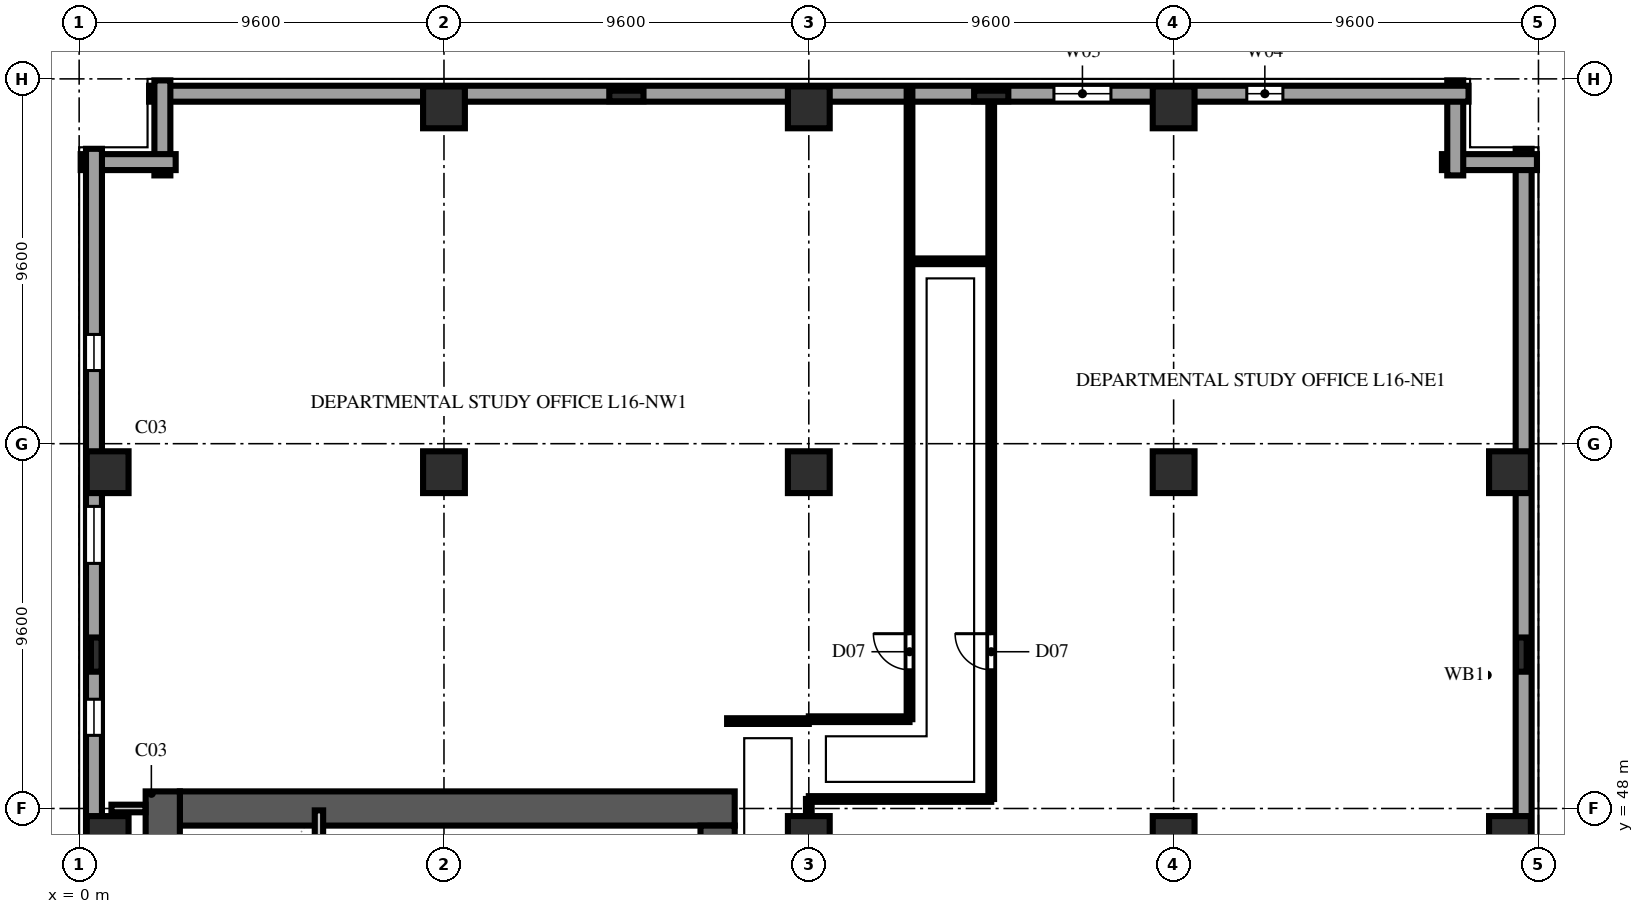
"""IFC4 building model, lengths in metres.
Left out: names, types, materials, properties, quantities, classifications, styles, units other than length and angle.
Written with IfcOpenShell. Run it as: python <this file> out.ifc"""

import sys

from ifc_helpers import new_model, si_unit, direction, frame, frame_2d, origin, origin_2d, place, context, subcontext, project, spatial, rectangle, extrude, element, fill, save


model = new_model("IFC4")
c1 = context("Model", 3, precision=1e-05, world=origin(), true_north=direction((0.0, 1.0)))
c2 = subcontext(c1, "Body", "Model", "MODEL_VIEW")
j1 = project(units=[si_unit("LENGTHUNIT", "METRE"), si_unit("PLANEANGLEUNIT", "RADIAN")], contexts=[c1])
p1 = place(None, origin())
s1 = spatial("IfcSite", under=j1, at=p1, CompositionType="ELEMENT")
p2 = place(p1, origin())
s2 = spatial("IfcBuilding", under=s1, at=p2, CompositionType="ELEMENT")
p3 = place(p2, frame((0.0, 0.0, 66.0)))
s3 = spatial("IfcBuildingStorey", under=s2, at=p3, CompositionType="ELEMENT", Elevation=66.0)
p4 = place(p3, frame((2.65, 48.0, 0.0), z_axis=(0.0, 0.0, 1.0), x_axis=(1.0, 0.0, 0.0)))
e1 = element("IfcWall", 1, at=p4, inside=s3, PredefinedType="SHEAR", context=c2, shape_type="SweptSolid", body=[
    extrude(rectangle(XDim=14.6, YDim=0.9, at=frame_2d((7.3, 0.0))), origin(), (0.0, 0.0, 1.0), 3.54),
])
p5 = place(p3, frame((2.2, 9.15, 0.0), z_axis=(0.0, 0.0, 1.0), x_axis=(0.0, 1.0, 0.0)))
e2 = element("IfcWall", 2, at=p5, inside=s3, PredefinedType="SHEAR", context=c2, shape_type="SweptSolid", body=[
    extrude(rectangle(XDim=39.3, YDim=0.9, at=frame_2d((19.65, 0.0))), origin(), (0.0, 0.0, 1.0), 3.54),
])
p6 = place(p3, frame((16.8, 36.4, 0.0), z_axis=(0.0, 0.0, 1.0), x_axis=(0.0, 1.0, 0.0)))
e3 = element("IfcWall", 3, at=p6, inside=s3, PredefinedType="SHEAR", context=c2, shape_type="SweptSolid", body=[
    extrude(rectangle(XDim=11.15, YDim=0.9, at=frame_2d((5.575, 0.0))), origin(), (0.0, 0.0, 1.0), 3.54),
])
p7 = place(p6, frame((9.2, 0.0, 0.0)))
e4 = element("IfcOpeningElement", 4, at=p7, cuts=e3, PredefinedType="OPENING", context=c2, shape_type="SweptSolid", body=[
    extrude(rectangle(XDim=0.95, YDim=2.15, at=frame_2d((0.475, 1.075))), frame((0.0, 0.462, 0.0), z_axis=(0.0, -1.0, 0.0), x_axis=(1.0, 0.0, 0.0)), (0.0, 0.0, 1.0), 0.924),
])
for number, where, z_axis, x_axis in (
    (5, (0.75, 47.25, 0.0), (0.0, 0.0, 1.0), (1.0, 0.0, 0.0)),
    (6, (0.75, 56.85, 0.0), (0.0, 0.0, 1.0), (1.0, 0.0, 0.0)),
    (7, (9.6, 56.85, 0.0), (0.0, 0.0, 1.0), (1.0, 0.0, 0.0)),
    (8, (9.6, 66.45, 0.0), (0.0, 0.0, 1.0), (1.0, 0.0, 0.0)),
    (9, (19.2, 47.25, 0.0), (0.0, 0.0, 1.0), (1.0, 0.0, 0.0)),
    (10, (19.2, 56.85, 0.0), (0.0, 0.0, 1.0), (1.0, 0.0, 0.0)),
    (11, (19.2, 66.45, 0.0), (0.0, 0.0, 1.0), (1.0, 0.0, 0.0)),
    (12, (28.8, 47.25, 0.0), (0.0, 0.0, 1.0), (1.0, 0.0, 0.0)),
    (13, (28.8, 56.85, 0.0), (0.0, 0.0, 1.0), (1.0, 0.0, 0.0)),
    (14, (28.8, 66.45, 0.0), (0.0, 0.0, 1.0), (1.0, 0.0, 0.0)),
    (15, (37.65, 47.25, 0.0), (0.0, 0.0, 1.0), (1.0, 0.0, 0.0)),
    (16, (37.65, 56.85, 0.0), (0.0, 0.0, 1.0), (1.0, 0.0, 0.0)),
):
    element("IfcColumn", number, at=place(p3, frame(where, z_axis=z_axis, x_axis=x_axis)), inside=s3, PredefinedType="COLUMN", context=c2, shape_type="SweptSolid", body=[
        extrude(rectangle(XDim=1.1, YDim=1.1, at=origin_2d()), origin(), (0.0, 0.0, 1.0), 3.8),
    ])
for number, where, z_axis, x_axis in (
    (17, (0.45, 52.05, 0.0), (0.0, 0.0, 1.0), (0.0, 1.0, 0.0)),
    (18, (14.4, 66.75, 0.0), (0.0, 0.0, 1.0), (1.0, 0.0, 0.0)),
    (19, (24.0, 66.75, 0.0), (0.0, 0.0, 1.0), (1.0, 0.0, 0.0)),
    (20, (37.95, 52.05, 0.0), (0.0, 0.0, 1.0), (0.0, 1.0, 0.0)),
):
    element("IfcColumn", number, at=place(p3, frame(where, z_axis=z_axis, x_axis=x_axis)), inside=s3, PredefinedType="PILASTER", context=c2, shape_type="SweptSolid", body=[
        extrude(rectangle(XDim=0.9, YDim=0.28, at=origin_2d()), origin(), (0.0, 0.0, 1.0), 3.8),
    ])
p8 = place(p3, frame((38.01, 37.66, 0.0), z_axis=(0.0, 0.0, 1.0), x_axis=(0.0, 1.0, 0.0)))
e21 = element("IfcWall", 21, at=p8, inside=s3, PredefinedType="SOLIDWALL", context=c2, shape_type="SweptSolid", body=[
    extrude(rectangle(XDim=27.7, YDim=0.42, at=frame_2d((13.85, 0.0))), origin(), (0.0, 0.0, 1.0), 3.54),
])
for number, where, z_axis, x_axis in (
    (22, (38.36, 65.01, 0.0), (0.0, 0.0, 1.0), (-1.0, 0.0, 0.0)),
    (23, (36.21, 64.66, 0.0), (0.0, 0.0, 1.0), (0.0, 1.0, 0.0)),
):
    element("IfcWall", number, at=place(p3, frame(where, z_axis=z_axis, x_axis=x_axis)), inside=s3, PredefinedType="SOLIDWALL", context=c2, shape_type="SweptSolid", body=[
        extrude(rectangle(XDim=2.5, YDim=0.42, at=frame_2d((1.25, 0.0))), origin(), (0.0, 0.0, 1.0), 3.54),
    ])
p9 = place(p3, frame((36.56, 66.81, 0.0), z_axis=(0.0, 0.0, 1.0), x_axis=(-1.0, 0.0, 0.0)))
e24 = element("IfcWall", 24, at=p9, inside=s3, PredefinedType="SOLIDWALL", context=c2, shape_type="SweptSolid", body=[
    extrude(rectangle(XDim=34.72, YDim=0.42, at=frame_2d((17.36, 0.0))), origin(), (0.0, 0.0, 1.0), 3.54),
])
p10 = place(p9, frame((4.885, 0.0, 0.9)))
e25 = element("IfcOpeningElement", 25, at=p10, cuts=e24, PredefinedType="OPENING", context=c2, shape_type="SweptSolid", body=[
    extrude(rectangle(XDim=0.95, YDim=1.85, at=frame_2d((0.475, 0.925))), frame((0.0, 0.222, 0.0), z_axis=(0.0, -1.0, 0.0), x_axis=(1.0, 0.0, 0.0)), (0.0, 0.0, 1.0), 0.444),
])
p11 = place(p9, frame((9.41, 0.0, 0.9)))
e26 = element("IfcOpeningElement", 26, at=p11, cuts=e24, PredefinedType="OPENING", context=c2, shape_type="SweptSolid", body=[
    extrude(rectangle(XDim=1.5, YDim=1.85, at=frame_2d((0.75, 0.925))), frame((0.0, 0.222, 0.0), z_axis=(0.0, -1.0, 0.0), x_axis=(1.0, 0.0, 0.0)), (0.0, 0.0, 1.0), 0.444),
])
for number, where, z_axis, x_axis in (
    (27, (2.19, 67.16, 0.0), (0.0, 0.0, 1.0), (0.0, -1.0, 0.0)),
    (28, (2.54, 65.01, 0.0), (0.0, 0.0, 1.0), (-1.0, 0.0, 0.0)),
):
    element("IfcWall", number, at=place(p3, frame(where, z_axis=z_axis, x_axis=x_axis)), inside=s3, PredefinedType="SOLIDWALL", context=c2, shape_type="SweptSolid", body=[
        extrude(rectangle(XDim=2.5, YDim=0.42, at=frame_2d((1.25, 0.0))), origin(), (0.0, 0.0, 1.0), 3.54),
    ])
p12 = place(p3, frame((0.39, 65.36, 0.0), z_axis=(0.0, 0.0, 1.0), x_axis=(0.0, -1.0, 0.0)))
e29 = element("IfcWall", 29, at=p12, inside=s3, PredefinedType="SOLIDWALL", context=c2, shape_type="SweptSolid", body=[
    extrude(rectangle(XDim=63.52, YDim=0.42, at=frame_2d((31.76, 0.0))), origin(), (0.0, 0.0, 1.0), 3.54),
])
p13 = place(p12, frame((4.885, 0.0, 0.9)))
e30 = element("IfcOpeningElement", 30, at=p13, cuts=e29, PredefinedType="OPENING", context=c2, shape_type="SweptSolid", body=[
    extrude(rectangle(XDim=0.95, YDim=1.85, at=frame_2d((0.475, 0.925))), frame((0.0, 0.222, 0.0), z_axis=(0.0, -1.0, 0.0), x_axis=(1.0, 0.0, 0.0)), (0.0, 0.0, 1.0), 0.444),
])
p14 = place(p12, frame((9.41, 0.0, 0.9)))
e31 = element("IfcOpeningElement", 31, at=p14, cuts=e29, PredefinedType="OPENING", context=c2, shape_type="SweptSolid", body=[
    extrude(rectangle(XDim=1.5, YDim=1.85, at=frame_2d((0.75, 0.925))), frame((0.0, 0.222, 0.0), z_axis=(0.0, -1.0, 0.0), x_axis=(1.0, 0.0, 0.0)), (0.0, 0.0, 1.0), 0.444),
])
p15 = place(p12, frame((14.485, 0.0, 0.9)))
e32 = element("IfcOpeningElement", 32, at=p15, cuts=e29, PredefinedType="OPENING", context=c2, shape_type="SweptSolid", body=[
    extrude(rectangle(XDim=0.95, YDim=1.85, at=frame_2d((0.475, 0.925))), frame((0.0, 0.222, 0.0), z_axis=(0.0, -1.0, 0.0), x_axis=(1.0, 0.0, 0.0)), (0.0, 0.0, 1.0), 0.444),
])
p16 = place(p12, frame((19.01, 0.0, 0.9)))
e33 = element("IfcOpeningElement", 33, at=p16, cuts=e29, PredefinedType="OPENING", context=c2, shape_type="SweptSolid", body=[
    extrude(rectangle(XDim=1.5, YDim=1.85, at=frame_2d((0.75, 0.925))), frame((0.0, 0.222, 0.0), z_axis=(0.0, -1.0, 0.0), x_axis=(1.0, 0.0, 0.0)), (0.0, 0.0, 1.0), 0.444),
])
p17 = place(p12, frame((24.085, 0.0, 0.9)))
e34 = element("IfcOpeningElement", 34, at=p17, cuts=e29, PredefinedType="OPENING", context=c2, shape_type="SweptSolid", body=[
    extrude(rectangle(XDim=0.95, YDim=1.85, at=frame_2d((0.475, 0.925))), frame((0.0, 0.222, 0.0), z_axis=(0.0, -1.0, 0.0), x_axis=(1.0, 0.0, 0.0)), (0.0, 0.0, 1.0), 0.444),
])
p18 = place(p12, frame((28.61, 0.0, 0.9)))
e35 = element("IfcOpeningElement", 35, at=p18, cuts=e29, PredefinedType="OPENING", context=c2, shape_type="SweptSolid", body=[
    extrude(rectangle(XDim=1.5, YDim=1.85, at=frame_2d((0.75, 0.925))), frame((0.0, 0.222, 0.0), z_axis=(0.0, -1.0, 0.0), x_axis=(1.0, 0.0, 0.0)), (0.0, 0.0, 1.0), 0.444),
])
p19 = place(p12, frame((33.685, 0.0, 0.9)))
e36 = element("IfcOpeningElement", 36, at=p19, cuts=e29, PredefinedType="OPENING", context=c2, shape_type="SweptSolid", body=[
    extrude(rectangle(XDim=0.95, YDim=1.85, at=frame_2d((0.475, 0.925))), frame((0.0, 0.222, 0.0), z_axis=(0.0, -1.0, 0.0), x_axis=(1.0, 0.0, 0.0)), (0.0, 0.0, 1.0), 0.444),
])
p20 = place(p12, frame((38.21, 0.0, 0.9)))
e37 = element("IfcOpeningElement", 37, at=p20, cuts=e29, PredefinedType="OPENING", context=c2, shape_type="SweptSolid", body=[
    extrude(rectangle(XDim=1.5, YDim=1.85, at=frame_2d((0.75, 0.925))), frame((0.0, 0.222, 0.0), z_axis=(0.0, -1.0, 0.0), x_axis=(1.0, 0.0, 0.0)), (0.0, 0.0, 1.0), 0.444),
])
p21 = place(p12, frame((43.285, 0.0, 0.9)))
e38 = element("IfcOpeningElement", 38, at=p21, cuts=e29, PredefinedType="OPENING", context=c2, shape_type="SweptSolid", body=[
    extrude(rectangle(XDim=0.95, YDim=1.85, at=frame_2d((0.475, 0.925))), frame((0.0, 0.222, 0.0), z_axis=(0.0, -1.0, 0.0), x_axis=(1.0, 0.0, 0.0)), (0.0, 0.0, 1.0), 0.444),
])
p22 = place(p12, frame((47.81, 0.0, 0.9)))
e39 = element("IfcOpeningElement", 39, at=p22, cuts=e29, PredefinedType="OPENING", context=c2, shape_type="SweptSolid", body=[
    extrude(rectangle(XDim=1.5, YDim=1.85, at=frame_2d((0.75, 0.925))), frame((0.0, 0.222, 0.0), z_axis=(0.0, -1.0, 0.0), x_axis=(1.0, 0.0, 0.0)), (0.0, 0.0, 1.0), 0.444),
])
p23 = place(p12, frame((52.885, 0.0, 0.9)))
e40 = element("IfcOpeningElement", 40, at=p23, cuts=e29, PredefinedType="OPENING", context=c2, shape_type="SweptSolid", body=[
    extrude(rectangle(XDim=0.95, YDim=1.85, at=frame_2d((0.475, 0.925))), frame((0.0, 0.222, 0.0), z_axis=(0.0, -1.0, 0.0), x_axis=(1.0, 0.0, 0.0)), (0.0, 0.0, 1.0), 0.444),
])
p24 = place(p12, frame((57.41, 0.0, 0.9)))
e41 = element("IfcOpeningElement", 41, at=p24, cuts=e29, PredefinedType="OPENING", context=c2, shape_type="SweptSolid", body=[
    extrude(rectangle(XDim=1.5, YDim=1.85, at=frame_2d((0.75, 0.925))), frame((0.0, 0.222, 0.0), z_axis=(0.0, -1.0, 0.0), x_axis=(1.0, 0.0, 0.0)), (0.0, 0.0, 1.0), 0.444),
])
p25 = place(p3, frame((6.31, 40.14, 0.0), z_axis=(0.0, 0.0, 1.0), x_axis=(0.0, 1.0, 0.0)))
e42 = element("IfcWall", 42, at=p25, inside=s3, PredefinedType="SOLIDWALL", context=c2, shape_type="SweptSolid", body=[
    extrude(rectangle(XDim=7.81, YDim=0.22, at=frame_2d((3.905, 0.0))), origin(), (0.0, 0.0, 1.0), 3.54),
])
p26 = place(p3, frame((0.85, 48.0, 0.0), z_axis=(0.0, 0.0, 1.0), x_axis=(1.0, 0.0, 0.0)))
e43 = element("IfcWall", 43, at=p26, inside=s3, PredefinedType="SOLIDWALL", context=c2, shape_type="SweptSolid", body=[
    extrude(rectangle(XDim=0.895, YDim=0.2, at=frame_2d((0.448, 0.0))), origin(), (0.0, 0.0, 1.0), 3.54),
])
p27 = place(p3, frame((17.05, 50.3, 0.0), z_axis=(0.0, 0.0, 1.0), x_axis=(1.0, 0.0, 0.0)))
e44 = element("IfcWall", 44, at=p27, inside=s3, PredefinedType="PARTITIONING", context=c2, shape_type="SweptSolid", body=[
    extrude(rectangle(XDim=2.15, YDim=0.15, at=frame_2d((1.075, 0.0))), origin(), (0.0, 0.0, 1.0), 3.54),
])
p28 = place(p3, frame((19.2, 30.65, 0.0), z_axis=(0.0, 0.0, 1.0), x_axis=(0.0, 1.0, 0.0)))
e45 = element("IfcWall", 45, at=p28, inside=s3, PredefinedType="PARTITIONING", context=c2, shape_type="SweptSolid", body=[
    extrude(rectangle(XDim=17.6, YDim=0.15, at=frame_2d((8.8, 0.0))), origin(), (0.0, 0.0, 1.0), 2.923),
])
p29 = place(p28, frame((11.35, 0.0, 0.0)))
e46 = element("IfcOpeningElement", 46, at=p29, cuts=e45, PredefinedType="OPENING", context=c2, shape_type="SweptSolid", body=[
    extrude(rectangle(XDim=1.0, YDim=2.2, at=frame_2d((0.5, 1.1))), frame((0.0, 0.087, 0.0), z_axis=(0.0, -1.0, 0.0), x_axis=(1.0, 0.0, 0.0)), (0.0, 0.0, 1.0), 0.174),
])
p30 = place(p3, frame((19.2, 48.25, 0.0), z_axis=(0.0, 0.0, 1.0), x_axis=(1.0, 0.0, 0.0)))
e47 = element("IfcWall", 47, at=p30, inside=s3, PredefinedType="PARTITIONING", context=c2, shape_type="SweptSolid", body=[
    extrude(rectangle(XDim=4.8, YDim=0.15, at=frame_2d((2.4, 0.0))), origin(), (0.0, 0.0, 1.0), 3.54),
])
p31 = place(p3, frame((19.2, 50.35, 0.0), z_axis=(0.0, 0.0, 1.0), x_axis=(1.0, 0.0, 0.0)))
e48 = element("IfcWall", 48, at=p31, inside=s3, PredefinedType="PARTITIONING", context=c2, shape_type="SweptSolid", body=[
    extrude(rectangle(XDim=2.65, YDim=0.15, at=frame_2d((1.325, 0.0))), origin(), (0.0, 0.0, 1.0), 3.54),
])
p32 = place(p3, frame((21.85, 62.4, 0.0), z_axis=(0.0, 0.0, 1.0), x_axis=(1.0, 0.0, 0.0)))
e49 = element("IfcWall", 49, at=p32, inside=s3, PredefinedType="PARTITIONING", context=c2, shape_type="SweptSolid", body=[
    extrude(rectangle(XDim=2.15, YDim=0.15, at=frame_2d((1.075, 0.0))), origin(), (0.0, 0.0, 1.0), 3.54),
])
p33 = place(p3, frame((24.0, 48.25, 0.0), z_axis=(0.0, 0.0, 1.0), x_axis=(0.0, 1.0, 0.0)))
e50 = element("IfcWall", 50, at=p33, inside=s3, PredefinedType="PARTITIONING", context=c2, shape_type="SweptSolid", body=[
    extrude(rectangle(XDim=18.73, YDim=0.15, at=frame_2d((9.365, 0.0))), origin(), (0.0, 0.0, 1.0), 3.54),
])
p34 = place(p33, frame((3.4, 0.0, 0.0)))
e51 = element("IfcOpeningElement", 51, at=p34, cuts=e50, PredefinedType="OPENING", context=c2, shape_type="SweptSolid", body=[
    extrude(rectangle(XDim=0.95, YDim=2.15, at=frame_2d((0.475, 1.075))), frame((0.0, 0.087, 0.0), z_axis=(0.0, -1.0, 0.0), x_axis=(1.0, 0.0, 0.0)), (0.0, 0.0, 1.0), 0.174),
])
p35 = place(p3, frame((21.85, 50.35, 0.0), z_axis=(0.0, 0.0, 1.0), x_axis=(0.0, 1.0, 0.0)))
e52 = element("IfcWall", 52, at=p35, inside=s3, PredefinedType="PARTITIONING", context=c2, shape_type="SweptSolid", body=[
    extrude(rectangle(XDim=16.63, YDim=0.15, at=frame_2d((8.315, 0.0))), origin(), (0.0, 0.0, 1.0), 3.54),
])
p36 = place(p35, frame((1.3, 0.0, 0.0)))
e53 = element("IfcOpeningElement", 53, at=p36, cuts=e52, PredefinedType="OPENING", context=c2, shape_type="SweptSolid", body=[
    extrude(rectangle(XDim=0.95, YDim=2.15, at=frame_2d((0.475, 1.075))), frame((0.0, 0.087, 0.0), z_axis=(0.0, -1.0, 0.0), x_axis=(1.0, 0.0, 0.0)), (0.0, 0.0, 1.0), 0.174),
])
p37 = place(p10, origin())
e54 = element("IfcWindow", 54, at=p37, inside=s3, PartitioningType="SINGLE_PANEL", PredefinedType="WINDOW", context=c2, shape_type="SweptSolid", body=[
    extrude(rectangle(XDim=0.95, YDim=1.85, at=frame_2d((0.475, 0.925))), frame((0.0, 0.11, 0.0), z_axis=(0.0, -1.0, 0.0), x_axis=(1.0, 0.0, 0.0)), (0.0, 0.0, 1.0), 0.06),
])
fill(e25, e54)
p38 = place(p11, origin())
e55 = element("IfcWindow", 55, at=p38, inside=s3, PartitioningType="DOUBLE_PANEL_VERTICAL", PredefinedType="WINDOW", context=c2, shape_type="SweptSolid", body=[
    extrude(rectangle(XDim=1.5, YDim=1.85, at=frame_2d((0.75, 0.925))), frame((0.0, 0.11, 0.0), z_axis=(0.0, -1.0, 0.0), x_axis=(1.0, 0.0, 0.0)), (0.0, 0.0, 1.0), 0.06),
])
fill(e26, e55)
p39 = place(p13, origin())
e56 = element("IfcWindow", 56, at=p39, inside=s3, PartitioningType="SINGLE_PANEL", PredefinedType="WINDOW", context=c2, shape_type="SweptSolid", body=[
    extrude(rectangle(XDim=0.95, YDim=1.85, at=frame_2d((0.475, 0.925))), frame((0.0, 0.11, 0.0), z_axis=(0.0, -1.0, 0.0), x_axis=(1.0, 0.0, 0.0)), (0.0, 0.0, 1.0), 0.06),
])
fill(e30, e56)
p40 = place(p14, origin())
e57 = element("IfcWindow", 57, at=p40, inside=s3, PartitioningType="DOUBLE_PANEL_VERTICAL", PredefinedType="WINDOW", context=c2, shape_type="SweptSolid", body=[
    extrude(rectangle(XDim=1.5, YDim=1.85, at=frame_2d((0.75, 0.925))), frame((0.0, 0.11, 0.0), z_axis=(0.0, -1.0, 0.0), x_axis=(1.0, 0.0, 0.0)), (0.0, 0.0, 1.0), 0.06),
])
fill(e31, e57)
p41 = place(p15, origin())
e58 = element("IfcWindow", 58, at=p41, inside=s3, PartitioningType="SINGLE_PANEL", PredefinedType="WINDOW", context=c2, shape_type="SweptSolid", body=[
    extrude(rectangle(XDim=0.95, YDim=1.85, at=frame_2d((0.475, 0.925))), frame((0.0, 0.11, 0.0), z_axis=(0.0, -1.0, 0.0), x_axis=(1.0, 0.0, 0.0)), (0.0, 0.0, 1.0), 0.06),
])
fill(e32, e58)
p42 = place(p34, origin())
e59 = element("IfcDoor", 59, at=p42, inside=s3, OperationType="SINGLE_SWING_RIGHT", PredefinedType="DOOR", context=c2, shape_type="SweptSolid", body=[
    extrude(rectangle(XDim=0.95, YDim=2.15, at=frame_2d((0.475, 1.075))), frame((0.0, 0.025, 0.0), z_axis=(0.0, -1.0, 0.0), x_axis=(1.0, 0.0, 0.0)), (0.0, 0.0, 1.0), 0.05),
])
fill(e51, e59)
p43 = place(p36, origin())
e60 = element("IfcDoor", 60, at=p43, inside=s3, OperationType="SINGLE_SWING_RIGHT", PredefinedType="DOOR", context=c2, shape_type="SweptSolid", body=[
    extrude(rectangle(XDim=0.95, YDim=2.15, at=frame_2d((0.475, 1.075))), frame((0.0, 0.025, 0.0), z_axis=(0.0, -1.0, 0.0), x_axis=(1.0, 0.0, 0.0)), (0.0, 0.0, 1.0), 0.05),
])
fill(e53, e60)
save(model, sys.argv[1])
